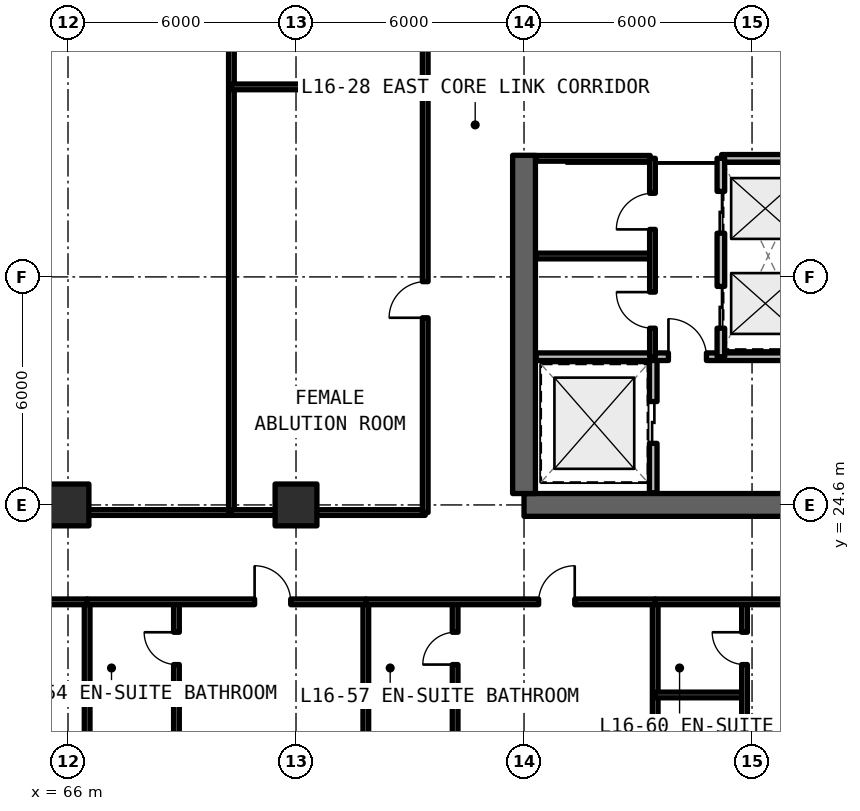
"""IFC4 building model, lengths in metres.
Left out: names, types, materials, properties, quantities, classifications, styles, units other than length and angle.
Written with IfcOpenShell. Run it as: python <this file> out.ifc"""

import sys

from ifc_helpers import new_model, si_unit, direction, frame, frame_2d, origin, origin_2d, place, context, subcontext, project, spatial, rectangle, extrude, element, fill, save


model = new_model("IFC4")
c1 = context("Model", 3, precision=1e-05, world=origin(), true_north=direction((0.0, 1.0)))
c2 = subcontext(c1, "Body", "Model", "MODEL_VIEW")
j1 = project(units=[si_unit("LENGTHUNIT", "METRE"), si_unit("PLANEANGLEUNIT", "RADIAN")], contexts=[c1])
p1 = place(None, origin())
s1 = spatial("IfcSite", under=j1, at=p1, CompositionType="ELEMENT")
p2 = place(p1, origin())
s2 = spatial("IfcBuilding", under=s1, at=p2, CompositionType="ELEMENT")
p3 = place(p2, frame((0.0, 0.0, 58.74)))
s3 = spatial("IfcBuildingStorey", under=s2, at=p3, CompositionType="ELEMENT", Elevation=58.74)
p4 = place(p3, frame((78.0, 24.6, 0.0), z_axis=(0.0, 0.0, 1.0), x_axis=(1.0, 0.0, 0.0)))
e1 = element("IfcWall", 1, at=p4, inside=s3, PredefinedType="SHEAR", context=c2, shape_type="SweptSolid", body=[
    extrude(rectangle(XDim=12.0, YDim=0.6, at=frame_2d((6.0, 0.0))), origin(), (0.0, 0.0, 1.0), 3.63),
])
p5 = place(p3, frame((78.0, 24.9, 0.0), z_axis=(0.0, 0.0, 1.0), x_axis=(0.0, 1.0, 0.0)))
e2 = element("IfcWall", 2, at=p5, inside=s3, PredefinedType="SHEAR", context=c2, shape_type="SweptSolid", body=[
    extrude(rectangle(XDim=8.9, YDim=0.6, at=frame_2d((4.45, 0.0))), origin(), (0.0, 0.0, 1.0), 3.63),
])
for number, where, z_axis, x_axis in (
    (3, (66.0, 24.6, 0.0), (0.0, 0.0, 1.0), (1.0, 0.0, 0.0)),
    (4, (72.0, 24.6, 0.0), (0.0, 0.0, 1.0), (1.0, 0.0, 0.0)),
):
    element("IfcColumn", number, at=place(p3, frame(where, z_axis=z_axis, x_axis=x_axis)), inside=s3, PredefinedType="COLUMN", context=c2, shape_type="SweptSolid", body=[
        extrude(rectangle(XDim=1.1, YDim=1.1, at=origin_2d()), origin(), (0.0, 0.0, 1.0), 3.63),
    ])
p6 = place(p3, frame((81.4, 24.92, 0.0), z_axis=(0.0, 0.0, 1.0), x_axis=(0.0, 1.0, 0.0)))
e5 = element("IfcWall", 5, at=p6, inside=s3, PredefinedType="SOLIDWALL", context=c2, shape_type="SweptSolid", body=[
    extrude(rectangle(XDim=3.58, YDim=0.2, at=frame_2d((1.79, 0.0))), origin(), (0.0, 0.0, 1.0), 2.63),
])
p7 = place(p6, frame((1.3, 0.0, 0.0)))
e6 = element("IfcOpeningElement", 6, at=p7, cuts=e5, PredefinedType="OPENING", context=c2, shape_type="SweptSolid", body=[
    extrude(rectangle(XDim=1.1, YDim=2.2, at=frame_2d((0.55, 1.1))), frame((0.0, 0.11, 0.0), z_axis=(0.0, -1.0, 0.0), x_axis=(1.0, 0.0, 0.0)), (0.0, 0.0, 1.0), 0.22),
])
p8 = place(p3, frame((78.32, 28.5, 0.0), z_axis=(0.0, 0.0, 1.0), x_axis=(1.0, 0.0, 0.0)))
e7 = element("IfcWall", 7, at=p8, inside=s3, PredefinedType="SOLIDWALL", context=c2, shape_type="SweptSolid", body=[
    extrude(rectangle(XDim=7.36, YDim=0.2, at=frame_2d((3.68, 0.0))), origin(), (0.0, 0.0, 1.0), 2.63),
])
p9 = place(p8, frame((3.48, 0.0, 0.0)))
e8 = element("IfcOpeningElement", 8, at=p9, cuts=e7, PredefinedType="OPENING", context=c2, shape_type="SweptSolid", body=[
    extrude(rectangle(XDim=1.0, YDim=2.15, at=frame_2d((0.5, 1.075))), frame((0.0, 0.11, 0.0), z_axis=(0.0, -1.0, 0.0), x_axis=(1.0, 0.0, 0.0)), (0.0, 0.0, 1.0), 0.22),
])
p10 = place(p3, frame((83.2, 33.72, 0.0), z_axis=(0.0, 0.0, 1.0), x_axis=(1.0, 0.0, 0.0)))
e9 = element("IfcWall", 9, at=p10, inside=s3, PredefinedType="SOLIDWALL", context=c2, shape_type="SweptSolid", body=[
    extrude(rectangle(XDim=2.48, YDim=0.2, at=frame_2d((1.24, 0.0))), origin(), (0.0, 0.0, 1.0), 2.63),
])
p11 = place(p3, frame((83.18, 28.5, 0.0), z_axis=(0.0, 0.0, 1.0), x_axis=(0.0, 1.0, 0.0)))
e10 = element("IfcWall", 10, at=p11, inside=s3, PredefinedType="SOLIDWALL", context=c2, shape_type="SweptSolid", body=[
    extrude(rectangle(XDim=5.22, YDim=0.2, at=frame_2d((2.61, 0.0))), origin(), (0.0, 0.0, 1.0), 2.63),
])
p12 = place(p11, frame((0.75, 0.0, 0.0)))
e11 = element("IfcOpeningElement", 11, at=p12, cuts=e10, PredefinedType="OPENING", context=c2, shape_type="SweptSolid", body=[
    extrude(rectangle(XDim=1.1, YDim=2.2, at=frame_2d((0.55, 1.1))), frame((0.0, 0.11, 0.0), z_axis=(0.0, -1.0, 0.0), x_axis=(1.0, 0.0, 0.0)), (0.0, 0.0, 1.0), 0.22),
])
p13 = place(p11, frame((3.25, 0.0, 0.0)))
e12 = element("IfcOpeningElement", 12, at=p13, cuts=e10, PredefinedType="OPENING", context=c2, shape_type="SweptSolid", body=[
    extrude(rectangle(XDim=1.1, YDim=2.2, at=frame_2d((0.55, 1.1))), frame((0.0, 0.11, 0.0), z_axis=(0.0, -1.0, 0.0), x_axis=(1.0, 0.0, 0.0)), (0.0, 0.0, 1.0), 0.22),
])
for number, where, z_axis, x_axis in (
    (13, (78.32, 31.15, 0.0), (0.0, 0.0, 1.0), (1.0, 0.0, 0.0)),
    (14, (78.32, 33.72, 0.0), (0.0, 0.0, 1.0), (1.0, 0.0, 0.0)),
):
    element("IfcWall", number, at=place(p3, frame(where, z_axis=z_axis, x_axis=x_axis)), inside=s3, PredefinedType="SOLIDWALL", context=c2, shape_type="SweptSolid", body=[
        extrude(rectangle(XDim=3.0, YDim=0.15, at=frame_2d((1.5, 0.0))), origin(), (0.0, 0.0, 1.0), 2.63),
    ])
p14 = place(p3, frame((81.38, 28.5, 0.0), z_axis=(0.0, 0.0, 1.0), x_axis=(0.0, 1.0, 0.0)))
e15 = element("IfcWall", 15, at=p14, inside=s3, PredefinedType="SOLIDWALL", context=c2, shape_type="SweptSolid", body=[
    extrude(rectangle(XDim=5.22, YDim=0.15, at=frame_2d((2.61, 0.0))), origin(), (0.0, 0.0, 1.0), 2.63),
])
p15 = place(p14, frame((0.75, 0.0, 0.0)))
e16 = element("IfcOpeningElement", 16, at=p15, cuts=e15, PredefinedType="OPENING", context=c2, shape_type="SweptSolid", body=[
    extrude(rectangle(XDim=0.95, YDim=2.15, at=frame_2d((0.475, 1.075))), frame((0.0, 0.085, 0.0), z_axis=(0.0, -1.0, 0.0), x_axis=(1.0, 0.0, 0.0)), (0.0, 0.0, 1.0), 0.17),
])
p16 = place(p14, frame((3.35, 0.0, 0.0)))
e17 = element("IfcOpeningElement", 17, at=p16, cuts=e15, PredefinedType="OPENING", context=c2, shape_type="SweptSolid", body=[
    extrude(rectangle(XDim=0.95, YDim=2.15, at=frame_2d((0.475, 1.075))), frame((0.0, 0.085, 0.0), z_axis=(0.0, -1.0, 0.0), x_axis=(1.0, 0.0, 0.0)), (0.0, 0.0, 1.0), 0.17),
])
p17 = place(p3, frame((42.9, 24.4, 0.0), z_axis=(0.0, 0.0, 1.0), x_axis=(1.0, 0.0, 0.0)))
e18 = element("IfcWall", 18, at=p17, inside=s3, PredefinedType="SOLIDWALL", context=c2, shape_type="SweptSolid", body=[
    extrude(rectangle(XDim=27.4, YDim=0.15, at=frame_2d((13.7, 0.0))), origin(), (0.0, 0.0, 1.0), 2.625),
])
p18 = place(p17, frame((13.0, 0.0, 0.0)))
e19 = element("IfcOpeningElement", 19, at=p18, cuts=e18, PredefinedType="OPENING", context=c2, shape_type="SweptSolid", body=[
    extrude(rectangle(XDim=1.4, YDim=2.15, at=frame_2d((0.7, 1.075))), frame((0.0, 0.085, 0.0), z_axis=(0.0, -1.0, 0.0), x_axis=(1.0, 0.0, 0.0)), (0.0, 0.0, 1.0), 0.17),
])
p19 = place(p3, frame((70.3, 24.4, 0.0), z_axis=(0.0, 0.0, 1.0), x_axis=(0.0, 1.0, 0.0)))
e20 = element("IfcWall", 20, at=p19, inside=s3, PredefinedType="SOLIDWALL", context=c2, shape_type="SweptSolid", body=[
    extrude(rectangle(XDim=18.4, YDim=0.15, at=frame_2d((9.2, 0.0))), origin(), (0.0, 0.0, 1.0), 2.63),
])
p20 = place(p3, frame((70.3, 24.4, 0.0), z_axis=(0.0, 0.0, 1.0), x_axis=(1.0, 0.0, 0.0)))
e21 = element("IfcWall", 21, at=p20, inside=s3, PredefinedType="SOLIDWALL", context=c2, shape_type="SweptSolid", body=[
    extrude(rectangle(XDim=5.1, YDim=0.15, at=frame_2d((2.55, 0.0))), origin(), (0.0, 0.0, 1.0), 2.625),
])
p21 = place(p3, frame((70.3, 35.6, 0.0), z_axis=(0.0, 0.0, 1.0), x_axis=(1.0, 0.0, 0.0)))
e22 = element("IfcWall", 22, at=p21, inside=s3, PredefinedType="SOLIDWALL", context=c2, shape_type="SweptSolid", body=[
    extrude(rectangle(XDim=5.1, YDim=0.15, at=frame_2d((2.55, 0.0))), origin(), (0.0, 0.0, 1.0), 2.63),
])
p22 = place(p3, frame((75.4, 24.4, 0.0), z_axis=(0.0, 0.0, 1.0), x_axis=(0.0, 1.0, 0.0)))
e23 = element("IfcWall", 23, at=p22, inside=s3, PredefinedType="SOLIDWALL", context=c2, shape_type="SweptSolid", body=[
    extrude(rectangle(XDim=11.2, YDim=0.15, at=frame_2d((5.6, 0.0))), origin(), (0.0, 0.0, 1.0), 2.63),
])
p23 = place(p22, frame((5.125, 0.0, 0.0)))
e24 = element("IfcOpeningElement", 24, at=p23, cuts=e23, PredefinedType="OPENING", context=c2, shape_type="SweptSolid", body=[
    extrude(rectangle(XDim=0.95, YDim=2.15, at=frame_2d((0.475, 1.075))), frame((0.0, 0.085, 0.0), z_axis=(0.0, -1.0, 0.0), x_axis=(1.0, 0.0, 0.0)), (0.0, 0.0, 1.0), 0.17),
])
p24 = place(p3, frame((75.4, 35.6, 0.0), z_axis=(0.0, 0.0, 1.0), x_axis=(0.0, 1.0, 0.0)))
e25 = element("IfcWall", 25, at=p24, inside=s3, PredefinedType="SOLIDWALL", context=c2, shape_type="SweptSolid", body=[
    extrude(rectangle(XDim=7.2, YDim=0.15, at=frame_2d((3.6, 0.0))), origin(), (0.0, 0.0, 1.0), 2.63),
])
p25 = place(p24, frame((3.125, 0.0, 0.0)))
e26 = element("IfcOpeningElement", 26, at=p25, cuts=e25, PredefinedType="OPENING", context=c2, shape_type="SweptSolid", body=[
    extrude(rectangle(XDim=0.95, YDim=2.15, at=frame_2d((0.475, 1.075))), frame((0.0, 0.085, 0.0), z_axis=(0.0, -1.0, 0.0), x_axis=(1.0, 0.0, 0.0)), (0.0, 0.0, 1.0), 0.17),
])
p26 = place(p3, frame((66.504, 10.446, 0.0), z_axis=(0.0, 0.0, 1.0), x_axis=(0.0, 1.0, 0.0)))
e27 = element("IfcWall", 27, at=p26, inside=s3, PredefinedType="SOLIDWALL", context=c2, shape_type="SweptSolid", body=[
    extrude(rectangle(XDim=11.604, YDim=0.15, at=frame_2d((5.802, 0.0))), origin(), (0.0, 0.0, 1.0), 2.63),
])
p27 = place(p3, frame((58.889, 22.05, 0.0), z_axis=(0.0, 0.0, 1.0), x_axis=(1.0, 0.0, 0.0)))
e28 = element("IfcWall", 28, at=p27, inside=s3, PredefinedType="SOLIDWALL", context=c2, shape_type="SweptSolid", body=[
    extrude(rectangle(XDim=7.615, YDim=0.15, at=frame_2d((3.808, 0.0))), origin(), (0.0, 0.0, 1.0), 2.63),
])
p28 = place(p27, frame((4.548, 0.0, 0.0)))
e29 = element("IfcOpeningElement", 29, at=p28, cuts=e28, PredefinedType="OPENING", context=c2, shape_type="SweptSolid", body=[
    extrude(rectangle(XDim=0.95, YDim=2.15, at=frame_2d((0.475, 1.075))), frame((0.0, 0.085, 0.0), z_axis=(0.0, -1.0, 0.0), x_axis=(1.0, 0.0, 0.0)), (0.0, 0.0, 1.0), 0.17),
])
p29 = place(p3, frame((73.837, 10.104, 0.0), z_axis=(0.0, 0.0, 1.0), x_axis=(0.0, 1.0, 0.0)))
e30 = element("IfcWall", 30, at=p29, inside=s3, PredefinedType="SOLIDWALL", context=c2, shape_type="SweptSolid", body=[
    extrude(rectangle(XDim=11.946, YDim=0.15, at=frame_2d((5.973, 0.0))), origin(), (0.0, 0.0, 1.0), 2.63),
])
p30 = place(p3, frame((66.504, 19.6, 0.0), z_axis=(0.0, 0.0, 1.0), x_axis=(1.0, 0.0, 0.0)))
e31 = element("IfcWall", 31, at=p30, inside=s3, PredefinedType="PARTITIONING", context=c2, shape_type="SweptSolid", body=[
    extrude(rectangle(XDim=2.35, YDim=0.15, at=frame_2d((1.175, 0.0))), origin(), (0.0, 0.0, 1.0), 2.63),
])
p31 = place(p3, frame((68.854, 10.336, 0.0), z_axis=(0.0, 0.0, 1.0), x_axis=(0.0, 1.0, 0.0)))
e32 = element("IfcWall", 32, at=p31, inside=s3, PredefinedType="PARTITIONING", context=c2, shape_type="SweptSolid", body=[
    extrude(rectangle(XDim=11.714, YDim=0.15, at=frame_2d((5.857, 0.0))), origin(), (0.0, 0.0, 1.0), 2.63),
])
p32 = place(p31, frame((3.814, 0.0, 0.0)))
e33 = element("IfcOpeningElement", 33, at=p32, cuts=e32, PredefinedType="OPENING", context=c2, shape_type="SweptSolid", body=[
    extrude(rectangle(XDim=0.85, YDim=2.1, at=frame_2d((0.425, 1.05))), frame((0.0, 0.085, 0.0), z_axis=(0.0, -1.0, 0.0), x_axis=(1.0, 0.0, 0.0)), (0.0, 0.0, 1.0), 0.17),
])
p33 = place(p31, frame((10.064, 0.0, 0.0)))
e34 = element("IfcOpeningElement", 34, at=p33, cuts=e32, PredefinedType="OPENING", context=c2, shape_type="SweptSolid", body=[
    extrude(rectangle(XDim=0.85, YDim=2.1, at=frame_2d((0.425, 1.05))), frame((0.0, 0.085, 0.0), z_axis=(0.0, -1.0, 0.0), x_axis=(1.0, 0.0, 0.0)), (0.0, 0.0, 1.0), 0.17),
])
p34 = place(p3, frame((66.504, 22.05, 0.0), z_axis=(0.0, 0.0, 1.0), x_axis=(1.0, 0.0, 0.0)))
e35 = element("IfcWall", 35, at=p34, inside=s3, PredefinedType="SOLIDWALL", context=c2, shape_type="SweptSolid", body=[
    extrude(rectangle(XDim=7.333, YDim=0.15, at=frame_2d((3.667, 0.0))), origin(), (0.0, 0.0, 1.0), 2.63),
])
p35 = place(p34, frame((4.406, 0.0, 0.0)))
e36 = element("IfcOpeningElement", 36, at=p35, cuts=e35, PredefinedType="OPENING", context=c2, shape_type="SweptSolid", body=[
    extrude(rectangle(XDim=0.95, YDim=2.15, at=frame_2d((0.475, 1.075))), frame((0.0, 0.085, 0.0), z_axis=(0.0, -1.0, 0.0), x_axis=(1.0, 0.0, 0.0)), (0.0, 0.0, 1.0), 0.17),
])
p36 = place(p3, frame((81.452, 9.75, 0.0), z_axis=(0.0, 0.0, 1.0), x_axis=(0.0, 1.0, 0.0)))
e37 = element("IfcWall", 37, at=p36, inside=s3, PredefinedType="SOLIDWALL", context=c2, shape_type="SweptSolid", body=[
    extrude(rectangle(XDim=12.3, YDim=0.15, at=frame_2d((6.15, 0.0))), origin(), (0.0, 0.0, 1.0), 2.63),
])
p37 = place(p3, frame((73.837, 19.6, 0.0), z_axis=(0.0, 0.0, 1.0), x_axis=(1.0, 0.0, 0.0)))
e38 = element("IfcWall", 38, at=p37, inside=s3, PredefinedType="PARTITIONING", context=c2, shape_type="SweptSolid", body=[
    extrude(rectangle(XDim=2.35, YDim=0.15, at=frame_2d((1.175, 0.0))), origin(), (0.0, 0.0, 1.0), 2.63),
])
p38 = place(p3, frame((76.187, 9.995, 0.0), z_axis=(0.0, 0.0, 1.0), x_axis=(0.0, 1.0, 0.0)))
e39 = element("IfcWall", 39, at=p38, inside=s3, PredefinedType="PARTITIONING", context=c2, shape_type="SweptSolid", body=[
    extrude(rectangle(XDim=12.055, YDim=0.15, at=frame_2d((6.027, 0.0))), origin(), (0.0, 0.0, 1.0), 2.63),
])
p39 = place(p38, frame((4.155, 0.0, 0.0)))
e40 = element("IfcOpeningElement", 40, at=p39, cuts=e39, PredefinedType="OPENING", context=c2, shape_type="SweptSolid", body=[
    extrude(rectangle(XDim=0.85, YDim=2.1, at=frame_2d((0.425, 1.05))), frame((0.0, 0.085, 0.0), z_axis=(0.0, -1.0, 0.0), x_axis=(1.0, 0.0, 0.0)), (0.0, 0.0, 1.0), 0.17),
])
p40 = place(p38, frame((10.405, 0.0, 0.0)))
e41 = element("IfcOpeningElement", 41, at=p40, cuts=e39, PredefinedType="OPENING", context=c2, shape_type="SweptSolid", body=[
    extrude(rectangle(XDim=0.85, YDim=2.1, at=frame_2d((0.425, 1.05))), frame((0.0, 0.085, 0.0), z_axis=(0.0, -1.0, 0.0), x_axis=(1.0, 0.0, 0.0)), (0.0, 0.0, 1.0), 0.17),
])
p41 = place(p3, frame((73.837, 22.05, 0.0), z_axis=(0.0, 0.0, 1.0), x_axis=(1.0, 0.0, 0.0)))
e42 = element("IfcWall", 42, at=p41, inside=s3, PredefinedType="SOLIDWALL", context=c2, shape_type="SweptSolid", body=[
    extrude(rectangle(XDim=7.615, YDim=0.15, at=frame_2d((3.808, 0.0))), origin(), (0.0, 0.0, 1.0), 2.63),
])
p42 = place(p41, frame((4.548, 0.0, 0.0)))
e43 = element("IfcOpeningElement", 43, at=p42, cuts=e42, PredefinedType="OPENING", context=c2, shape_type="SweptSolid", body=[
    extrude(rectangle(XDim=0.95, YDim=2.15, at=frame_2d((0.475, 1.075))), frame((0.0, 0.085, 0.0), z_axis=(0.0, -1.0, 0.0), x_axis=(1.0, 0.0, 0.0)), (0.0, 0.0, 1.0), 0.17),
])
p43 = place(p3, frame((81.452, 19.6, 0.0), z_axis=(0.0, 0.0, 1.0), x_axis=(1.0, 0.0, 0.0)))
e44 = element("IfcWall", 44, at=p43, inside=s3, PredefinedType="PARTITIONING", context=c2, shape_type="SweptSolid", body=[
    extrude(rectangle(XDim=2.35, YDim=0.15, at=frame_2d((1.175, 0.0))), origin(), (0.0, 0.0, 1.0), 2.63),
])
p44 = place(p3, frame((83.802, 9.641, 0.0), z_axis=(0.0, 0.0, 1.0), x_axis=(0.0, 1.0, 0.0)))
e45 = element("IfcWall", 45, at=p44, inside=s3, PredefinedType="PARTITIONING", context=c2, shape_type="SweptSolid", body=[
    extrude(rectangle(XDim=12.409, YDim=0.15, at=frame_2d((6.205, 0.0))), origin(), (0.0, 0.0, 1.0), 2.63),
])
p45 = place(p44, frame((4.509, 0.0, 0.0)))
e46 = element("IfcOpeningElement", 46, at=p45, cuts=e45, PredefinedType="OPENING", context=c2, shape_type="SweptSolid", body=[
    extrude(rectangle(XDim=0.85, YDim=2.1, at=frame_2d((0.425, 1.05))), frame((0.0, 0.085, 0.0), z_axis=(0.0, -1.0, 0.0), x_axis=(1.0, 0.0, 0.0)), (0.0, 0.0, 1.0), 0.17),
])
p46 = place(p44, frame((10.759, 0.0, 0.0)))
e47 = element("IfcOpeningElement", 47, at=p46, cuts=e45, PredefinedType="OPENING", context=c2, shape_type="SweptSolid", body=[
    extrude(rectangle(XDim=0.85, YDim=2.1, at=frame_2d((0.425, 1.05))), frame((0.0, 0.085, 0.0), z_axis=(0.0, -1.0, 0.0), x_axis=(1.0, 0.0, 0.0)), (0.0, 0.0, 1.0), 0.17),
])
p47 = place(p3, frame((81.452, 22.05, 0.0), z_axis=(0.0, 0.0, 1.0), x_axis=(1.0, 0.0, 0.0)))
e48 = element("IfcWall", 48, at=p47, inside=s3, PredefinedType="SOLIDWALL", context=c2, shape_type="SweptSolid", body=[
    extrude(rectangle(XDim=7.333, YDim=0.15, at=frame_2d((3.667, 0.0))), origin(), (0.0, 0.0, 1.0), 2.63),
])
p48 = place(p47, frame((4.406, 0.0, 0.0)))
e49 = element("IfcOpeningElement", 49, at=p48, cuts=e48, PredefinedType="OPENING", context=c2, shape_type="SweptSolid", body=[
    extrude(rectangle(XDim=0.95, YDim=2.15, at=frame_2d((0.475, 1.075))), frame((0.0, 0.085, 0.0), z_axis=(0.0, -1.0, 0.0), x_axis=(1.0, 0.0, 0.0)), (0.0, 0.0, 1.0), 0.17),
])
p49 = place(p7, origin())
e50 = element("IfcDoor", 50, at=p49, inside=s3, OperationType="SLIDING_TO_LEFT", PredefinedType="DOOR", context=c2, shape_type="SweptSolid", body=[
    extrude(rectangle(XDim=1.1, YDim=2.2, at=frame_2d((0.55, 1.1))), frame((0.0, 0.025, 0.0), z_axis=(0.0, -1.0, 0.0), x_axis=(1.0, 0.0, 0.0)), (0.0, 0.0, 1.0), 0.05),
])
fill(e6, e50)
p50 = place(p9, origin())
e51 = element("IfcDoor", 51, at=p50, inside=s3, OperationType="SINGLE_SWING_LEFT", PredefinedType="DOOR", context=c2, shape_type="SweptSolid", body=[
    extrude(rectangle(XDim=1.0, YDim=2.15, at=frame_2d((0.5, 1.075))), frame((0.0, 0.025, 0.0), z_axis=(0.0, -1.0, 0.0), x_axis=(1.0, 0.0, 0.0)), (0.0, 0.0, 1.0), 0.05),
])
fill(e8, e51)
p51 = place(p12, origin())
e52 = element("IfcDoor", 52, at=p51, inside=s3, OperationType="SLIDING_TO_LEFT", PredefinedType="DOOR", context=c2, shape_type="SweptSolid", body=[
    extrude(rectangle(XDim=1.1, YDim=2.2, at=frame_2d((0.55, 1.1))), frame((0.0, 0.025, 0.0), z_axis=(0.0, -1.0, 0.0), x_axis=(1.0, 0.0, 0.0)), (0.0, 0.0, 1.0), 0.05),
])
fill(e11, e52)
p52 = place(p13, origin())
e53 = element("IfcDoor", 53, at=p52, inside=s3, OperationType="SLIDING_TO_RIGHT", PredefinedType="DOOR", context=c2, shape_type="SweptSolid", body=[
    extrude(rectangle(XDim=1.1, YDim=2.2, at=frame_2d((0.55, 1.1))), frame((0.0, 0.025, 0.0), z_axis=(0.0, -1.0, 0.0), x_axis=(1.0, 0.0, 0.0)), (0.0, 0.0, 1.0), 0.05),
])
fill(e12, e53)
p53 = place(p15, origin())
e54 = element("IfcDoor", 54, at=p53, inside=s3, OperationType="SINGLE_SWING_RIGHT", PredefinedType="DOOR", context=c2, shape_type="SweptSolid", body=[
    extrude(rectangle(XDim=0.95, YDim=2.15, at=frame_2d((0.475, 1.075))), frame((0.0, 0.025, 0.0), z_axis=(0.0, -1.0, 0.0), x_axis=(1.0, 0.0, 0.0)), (0.0, 0.0, 1.0), 0.05),
])
fill(e16, e54)
p54 = place(p16, origin())
e55 = element("IfcDoor", 55, at=p54, inside=s3, OperationType="SINGLE_SWING_LEFT", PredefinedType="DOOR", context=c2, shape_type="SweptSolid", body=[
    extrude(rectangle(XDim=0.95, YDim=2.15, at=frame_2d((0.475, 1.075))), frame((0.0, 0.025, 0.0), z_axis=(0.0, -1.0, 0.0), x_axis=(1.0, 0.0, 0.0)), (0.0, 0.0, 1.0), 0.05),
])
fill(e17, e55)
p55 = place(p23, origin())
e56 = element("IfcDoor", 56, at=p55, inside=s3, OperationType="SINGLE_SWING_LEFT", PredefinedType="DOOR", context=c2, shape_type="SweptSolid", body=[
    extrude(rectangle(XDim=0.95, YDim=2.15, at=frame_2d((0.475, 1.075))), frame((0.0, 0.025, 0.0), z_axis=(0.0, -1.0, 0.0), x_axis=(1.0, 0.0, 0.0)), (0.0, 0.0, 1.0), 0.05),
])
fill(e24, e56)
p56 = place(p33, origin())
e57 = element("IfcDoor", 57, at=p56, inside=s3, OperationType="SINGLE_SWING_RIGHT", PredefinedType="DOOR", context=c2, shape_type="SweptSolid", body=[
    extrude(rectangle(XDim=0.85, YDim=2.1, at=frame_2d((0.425, 1.05))), frame((0.0, 0.025, 0.0), z_axis=(0.0, -1.0, 0.0), x_axis=(1.0, 0.0, 0.0)), (0.0, 0.0, 1.0), 0.05),
])
fill(e34, e57)
p57 = place(p35, origin())
e58 = element("IfcDoor", 58, at=p57, inside=s3, OperationType="SINGLE_SWING_LEFT", PredefinedType="DOOR", context=c2, shape_type="SweptSolid", body=[
    extrude(rectangle(XDim=0.95, YDim=2.15, at=frame_2d((0.475, 1.075))), frame((0.0, 0.025, 0.0), z_axis=(0.0, -1.0, 0.0), x_axis=(1.0, 0.0, 0.0)), (0.0, 0.0, 1.0), 0.05),
])
fill(e36, e58)
p58 = place(p40, origin())
e59 = element("IfcDoor", 59, at=p58, inside=s3, OperationType="SINGLE_SWING_LEFT", PredefinedType="DOOR", context=c2, shape_type="SweptSolid", body=[
    extrude(rectangle(XDim=0.85, YDim=2.1, at=frame_2d((0.425, 1.05))), frame((0.0, 0.025, 0.0), z_axis=(0.0, -1.0, 0.0), x_axis=(1.0, 0.0, 0.0)), (0.0, 0.0, 1.0), 0.05),
])
fill(e41, e59)
p59 = place(p42, origin())
e60 = element("IfcDoor", 60, at=p59, inside=s3, OperationType="SINGLE_SWING_RIGHT", PredefinedType="DOOR", context=c2, shape_type="SweptSolid", body=[
    extrude(rectangle(XDim=0.95, YDim=2.15, at=frame_2d((0.475, 1.075))), frame((0.0, 0.025, 0.0), z_axis=(0.0, -1.0, 0.0), x_axis=(1.0, 0.0, 0.0)), (0.0, 0.0, 1.0), 0.05),
])
fill(e43, e60)
p60 = place(p46, origin())
e61 = element("IfcDoor", 61, at=p60, inside=s3, OperationType="SINGLE_SWING_RIGHT", PredefinedType="DOOR", context=c2, shape_type="SweptSolid", body=[
    extrude(rectangle(XDim=0.85, YDim=2.1, at=frame_2d((0.425, 1.05))), frame((0.0, 0.025, 0.0), z_axis=(0.0, -1.0, 0.0), x_axis=(1.0, 0.0, 0.0)), (0.0, 0.0, 1.0), 0.05),
])
fill(e47, e61)
save(model, sys.argv[1])
